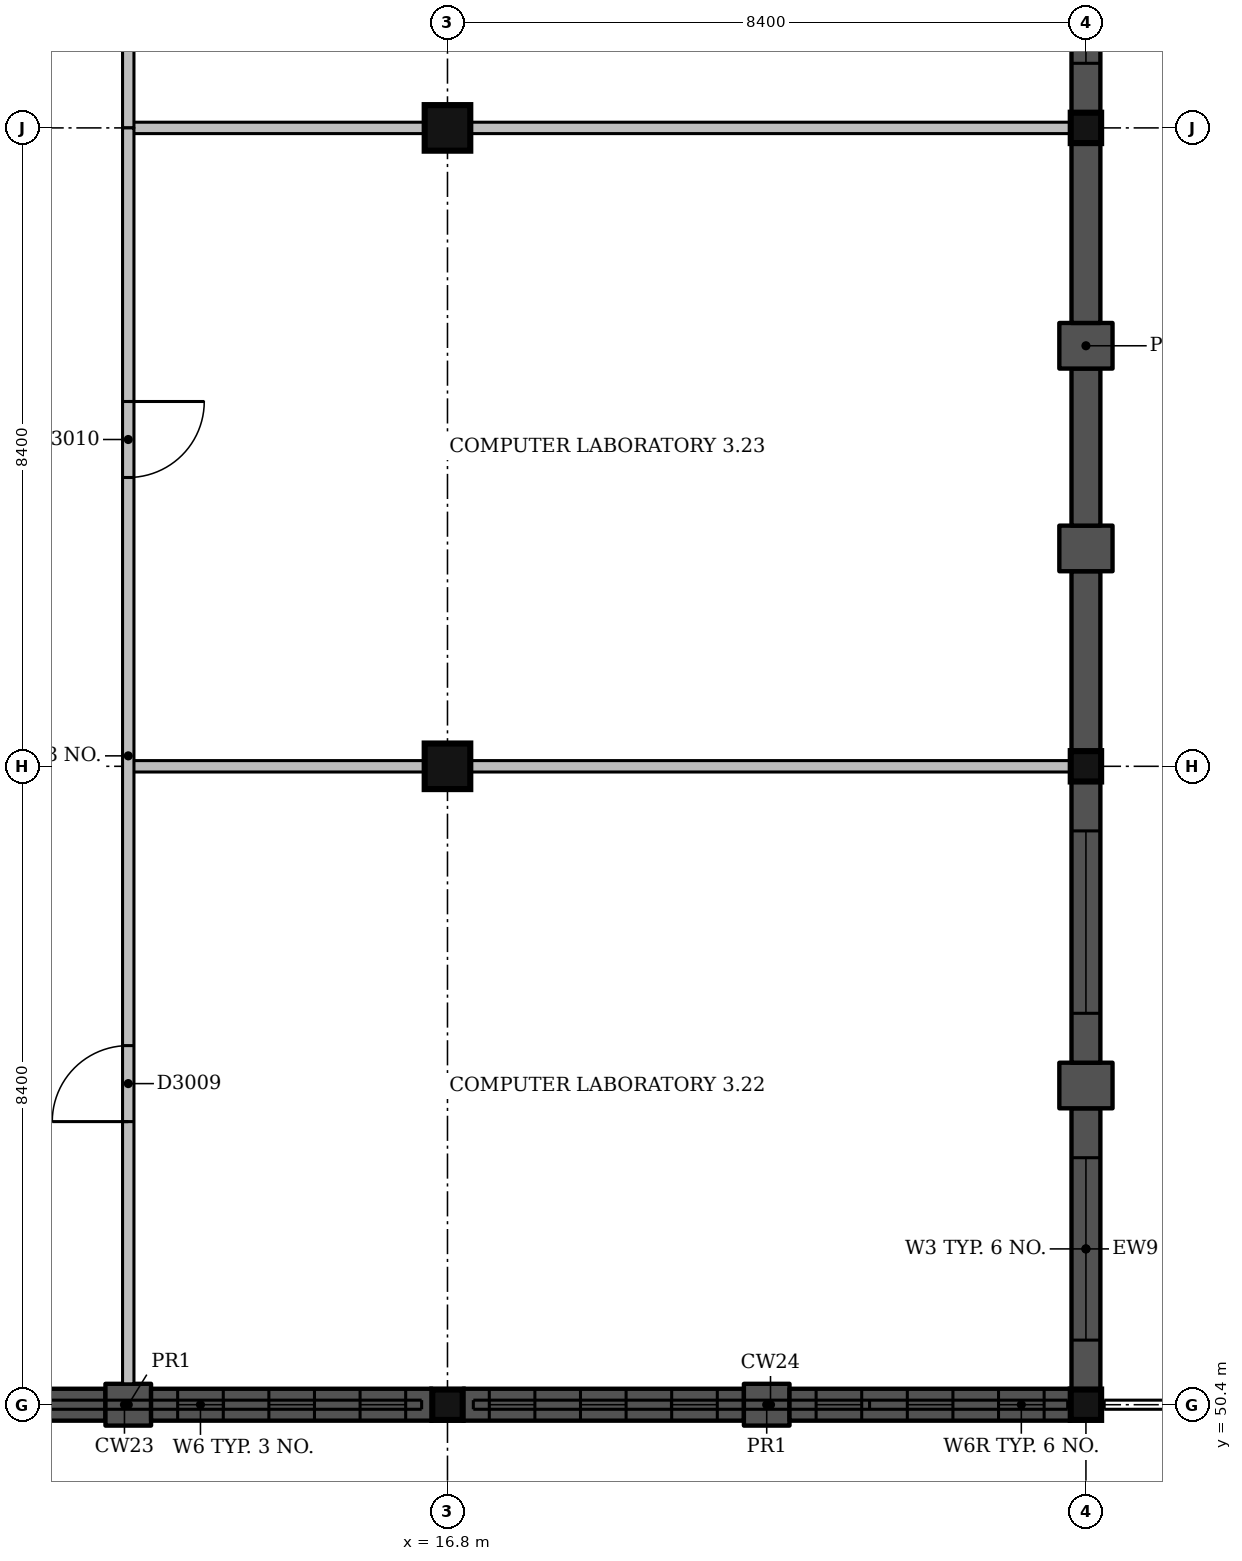
"""IFC4 building model, lengths in metres.
Left out: names, types, materials, properties, quantities, classifications, styles, units other than length and angle.
Written with IfcOpenShell. Run it as: python <this file> out.ifc"""

import sys

from ifc_helpers import new_model, si_unit, direction, frame, frame_2d, origin, origin_2d, place, context, subcontext, project, spatial, rectangle, extrude, element, fill, save


model = new_model("IFC4")
c1 = context("Model", 3, precision=1e-05, world=origin(), true_north=direction((0.0, 1.0)))
c2 = subcontext(c1, "Body", "Model", "MODEL_VIEW")
j1 = project(units=[si_unit("LENGTHUNIT", "METRE"), si_unit("PLANEANGLEUNIT", "RADIAN")], contexts=[c1])
p1 = place(None, origin())
s1 = spatial("IfcSite", under=j1, at=p1, CompositionType="ELEMENT")
p2 = place(p1, origin())
s2 = spatial("IfcBuilding", under=s1, at=p2, CompositionType="ELEMENT")
p3 = place(p2, frame((0.0, 0.0, 13.5)))
s3 = spatial("IfcBuildingStorey", under=s2, at=p3, CompositionType="ELEMENT", Elevation=13.5)
p4 = place(p3, frame((16.8, 50.4, 0.0), z_axis=(0.0, 0.0, 1.0), x_axis=(1.0, 0.0, 0.0)))
e1 = element("IfcColumn", 1, at=p4, inside=s3, PredefinedType="COLUMN", context=c2, shape_type="SweptSolid", body=[
    extrude(rectangle(XDim=0.4, YDim=0.4, at=origin_2d()), origin(), (0.0, 0.0, 1.0), 4.5),
])
for number, where, z_axis, x_axis in (
    (2, (16.8, 58.8, 0.0), (0.0, 0.0, 1.0), (1.0, 0.0, 0.0)),
    (3, (16.8, 67.2, 0.0), (0.0, 0.0, 1.0), (1.0, 0.0, 0.0)),
):
    element("IfcColumn", number, at=place(p3, frame(where, z_axis=z_axis, x_axis=x_axis)), inside=s3, PredefinedType="COLUMN", context=c2, shape_type="SweptSolid", body=[
        extrude(rectangle(XDim=0.6, YDim=0.6, at=origin_2d()), origin(), (0.0, 0.0, 1.0), 4.5),
    ])
for number, where, z_axis, x_axis in (
    (4, (25.2, 50.4, 0.0), (0.0, 0.0, 1.0), (1.0, 0.0, 0.0)),
    (5, (25.2, 58.8, 0.0), (0.0, 0.0, 1.0), (1.0, 0.0, 0.0)),
    (6, (25.2, 67.2, 0.0), (0.0, 0.0, 1.0), (1.0, 0.0, 0.0)),
):
    element("IfcColumn", number, at=place(p3, frame(where, z_axis=z_axis, x_axis=x_axis)), inside=s3, PredefinedType="COLUMN", context=c2, shape_type="SweptSolid", body=[
        extrude(rectangle(XDim=0.4, YDim=0.4, at=origin_2d()), origin(), (0.0, 0.0, 1.0), 4.5),
    ])
p5 = place(p3, frame((25.2, 50.6, 0.0), z_axis=(0.0, 0.0, 1.0), x_axis=(0.0, 1.0, 0.0)))
e7 = element("IfcWall", 7, at=p5, inside=s3, PredefinedType="SOLIDWALL", context=c2, shape_type="SweptSolid", body=[
    extrude(rectangle(XDim=3.7, YDim=0.38, at=frame_2d((1.85, 0.0))), origin(), (0.0, 0.0, 1.0), 4.2),
])
p6 = place(p5, frame((0.65, 0.0, 1.2)))
e8 = element("IfcOpeningElement", 8, at=p6, cuts=e7, PredefinedType="OPENING", context=c2, shape_type="SweptSolid", body=[
    extrude(rectangle(XDim=2.4, YDim=1.5, at=frame_2d((1.2, 0.75))), frame((0.0, 0.2, 0.0), z_axis=(0.0, -1.0, 0.0), x_axis=(1.0, 0.0, 0.0)), (0.0, 0.0, 1.0), 0.4),
])
p7 = place(p3, frame((25.2, 54.3, 0.0), z_axis=(0.0, 0.0, 1.0), x_axis=(0.0, 1.0, 0.0)))
e9 = element("IfcWall", 9, at=p7, inside=s3, PredefinedType="SOLIDWALL", context=c2, shape_type="SweptSolid", body=[
    extrude(rectangle(XDim=0.6, YDim=0.7, at=frame_2d((0.3, 0.0))), origin(), (0.0, 0.0, 1.0), 4.2),
])
p8 = place(p3, frame((25.2, 54.9, 0.0), z_axis=(0.0, 0.0, 1.0), x_axis=(0.0, 1.0, 0.0)))
e10 = element("IfcWall", 10, at=p8, inside=s3, PredefinedType="SOLIDWALL", context=c2, shape_type="SweptSolid", body=[
    extrude(rectangle(XDim=3.7, YDim=0.38, at=frame_2d((1.85, 0.0))), origin(), (0.0, 0.0, 1.0), 4.2),
])
p9 = place(p8, frame((0.65, 0.0, 1.2)))
e11 = element("IfcOpeningElement", 11, at=p9, cuts=e10, PredefinedType="OPENING", context=c2, shape_type="SweptSolid", body=[
    extrude(rectangle(XDim=2.4, YDim=1.5, at=frame_2d((1.2, 0.75))), frame((0.0, 0.2, 0.0), z_axis=(0.0, -1.0, 0.0), x_axis=(1.0, 0.0, 0.0)), (0.0, 0.0, 1.0), 0.4),
])
p10 = place(p3, frame((25.2, 59.0, 0.0), z_axis=(0.0, 0.0, 1.0), x_axis=(0.0, 1.0, 0.0)))
e12 = element("IfcWall", 12, at=p10, inside=s3, PredefinedType="SOLIDWALL", context=c2, shape_type="SweptSolid", body=[
    extrude(rectangle(XDim=2.367, YDim=0.38, at=frame_2d((1.183, 0.0))), origin(), (0.0, 0.0, 1.0), 3.35),
])
p11 = place(p3, frame((25.2, 61.367, 0.0), z_axis=(0.0, 0.0, 1.0), x_axis=(0.0, 1.0, 0.0)))
e13 = element("IfcWall", 13, at=p11, inside=s3, PredefinedType="SOLIDWALL", context=c2, shape_type="SweptSolid", body=[
    extrude(rectangle(XDim=0.6, YDim=0.7, at=frame_2d((0.3, 0.0))), origin(), (0.0, 0.0, 1.0), 3.35),
])
p12 = place(p3, frame((25.2, 61.967, 0.0), z_axis=(0.0, 0.0, 1.0), x_axis=(0.0, 1.0, 0.0)))
e14 = element("IfcWall", 14, at=p12, inside=s3, PredefinedType="SOLIDWALL", context=c2, shape_type="SweptSolid", body=[
    extrude(rectangle(XDim=2.066, YDim=0.38, at=frame_2d((1.033, 0.0))), origin(), (0.0, 0.0, 1.0), 3.35),
])
p13 = place(p3, frame((25.2, 64.033, 0.0), z_axis=(0.0, 0.0, 1.0), x_axis=(0.0, 1.0, 0.0)))
e15 = element("IfcWall", 15, at=p13, inside=s3, PredefinedType="SOLIDWALL", context=c2, shape_type="SweptSolid", body=[
    extrude(rectangle(XDim=0.6, YDim=0.7, at=frame_2d((0.3, 0.0))), origin(), (0.0, 0.0, 1.0), 3.35),
])
p14 = place(p3, frame((25.2, 64.633, 0.0), z_axis=(0.0, 0.0, 1.0), x_axis=(0.0, 1.0, 0.0)))
e16 = element("IfcWall", 16, at=p14, inside=s3, PredefinedType="SOLIDWALL", context=c2, shape_type="SweptSolid", body=[
    extrude(rectangle(XDim=2.367, YDim=0.38, at=frame_2d((1.183, 0.0))), origin(), (0.0, 0.0, 1.0), 3.35),
])
p15 = place(p3, frame((25.2, 67.4, 0.0), z_axis=(0.0, 0.0, 1.0), x_axis=(0.0, 1.0, 0.0)))
e17 = element("IfcWall", 17, at=p15, inside=s3, PredefinedType="SOLIDWALL", context=c2, shape_type="SweptSolid", body=[
    extrude(rectangle(XDim=3.7, YDim=0.38, at=frame_2d((1.85, 0.0))), origin(), (0.0, 0.0, 1.0), 3.35),
])
p16 = place(p15, frame((0.65, 0.0, 1.2)))
e18 = element("IfcOpeningElement", 18, at=p16, cuts=e17, PredefinedType="OPENING", context=c2, shape_type="SweptSolid", body=[
    extrude(rectangle(XDim=2.4, YDim=1.5, at=frame_2d((1.2, 0.75))), frame((0.0, 0.2, 0.0), z_axis=(0.0, -1.0, 0.0), x_axis=(1.0, 0.0, 0.0)), (0.0, 0.0, 1.0), 0.4),
])
p17 = place(p3, frame((8.6, 50.4, 0.0), z_axis=(0.0, 0.0, 1.0), x_axis=(1.0, 0.0, 0.0)))
e19 = element("IfcWall", 19, at=p17, inside=s3, PredefinedType="SOLIDWALL", context=c2, shape_type="SweptSolid", body=[
    extrude(rectangle(XDim=3.7, YDim=0.42, at=frame_2d((1.85, 0.0))), origin(), (0.0, 0.0, 1.0), 4.2),
])
p18 = place(p3, frame((12.3, 50.4, 0.0), z_axis=(0.0, 0.0, 1.0), x_axis=(1.0, 0.0, 0.0)))
e20 = element("IfcWall", 20, at=p18, inside=s3, PredefinedType="SOLIDWALL", context=c2, shape_type="SweptSolid", body=[
    extrude(rectangle(XDim=0.6, YDim=0.55, at=frame_2d((0.3, 0.0))), origin(), (0.0, 0.0, 1.0), 4.2),
])
p19 = place(p3, frame((12.9, 50.4, 0.0), z_axis=(0.0, 0.0, 1.0), x_axis=(1.0, 0.0, 0.0)))
e21 = element("IfcWall", 21, at=p19, inside=s3, PredefinedType="SOLIDWALL", context=c2, shape_type="SweptSolid", body=[
    extrude(rectangle(XDim=3.7, YDim=0.42, at=frame_2d((1.85, 0.0))), origin(), (0.0, 0.0, 1.0), 4.2),
])
p20 = place(p19, frame((0.35, 0.0, 1.0)))
e22 = element("IfcOpeningElement", 22, at=p20, cuts=e21, PredefinedType="OPENING", context=c2, shape_type="SweptSolid", body=[
    extrude(rectangle(XDim=0.6, YDim=2.1, at=frame_2d((0.3, 1.05))), frame((0.0, 0.22, 0.0), z_axis=(0.0, -1.0, 0.0), x_axis=(1.0, 0.0, 0.0)), (0.0, 0.0, 1.0), 0.44),
])
p21 = place(p19, frame((1.55, 0.0, 1.0)))
e23 = element("IfcOpeningElement", 23, at=p21, cuts=e21, PredefinedType="OPENING", context=c2, shape_type="SweptSolid", body=[
    extrude(rectangle(XDim=0.6, YDim=2.1, at=frame_2d((0.3, 1.05))), frame((0.0, 0.22, 0.0), z_axis=(0.0, -1.0, 0.0), x_axis=(1.0, 0.0, 0.0)), (0.0, 0.0, 1.0), 0.44),
])
p22 = place(p19, frame((2.75, 0.0, 1.0)))
e24 = element("IfcOpeningElement", 24, at=p22, cuts=e21, PredefinedType="OPENING", context=c2, shape_type="SweptSolid", body=[
    extrude(rectangle(XDim=0.6, YDim=2.1, at=frame_2d((0.3, 1.05))), frame((0.0, 0.22, 0.0), z_axis=(0.0, -1.0, 0.0), x_axis=(1.0, 0.0, 0.0)), (0.0, 0.0, 1.0), 0.44),
])
p23 = place(p3, frame((17.0, 50.4, 0.0), z_axis=(0.0, 0.0, 1.0), x_axis=(1.0, 0.0, 0.0)))
e25 = element("IfcWall", 25, at=p23, inside=s3, PredefinedType="SOLIDWALL", context=c2, shape_type="SweptSolid", body=[
    extrude(rectangle(XDim=3.7, YDim=0.42, at=frame_2d((1.85, 0.0))), origin(), (0.0, 0.0, 1.0), 3.35),
])
p24 = place(p23, frame((0.35, 0.0, 1.0)))
e26 = element("IfcOpeningElement", 26, at=p24, cuts=e25, PredefinedType="OPENING", context=c2, shape_type="SweptSolid", body=[
    extrude(rectangle(XDim=0.6, YDim=1.8, at=frame_2d((0.3, 0.9))), frame((0.0, 0.22, 0.0), z_axis=(0.0, -1.0, 0.0), x_axis=(1.0, 0.0, 0.0)), (0.0, 0.0, 1.0), 0.44),
])
p25 = place(p23, frame((1.55, 0.0, 1.0)))
e27 = element("IfcOpeningElement", 27, at=p25, cuts=e25, PredefinedType="OPENING", context=c2, shape_type="SweptSolid", body=[
    extrude(rectangle(XDim=0.6, YDim=1.8, at=frame_2d((0.3, 0.9))), frame((0.0, 0.22, 0.0), z_axis=(0.0, -1.0, 0.0), x_axis=(1.0, 0.0, 0.0)), (0.0, 0.0, 1.0), 0.44),
])
p26 = place(p23, frame((2.75, 0.0, 1.0)))
e28 = element("IfcOpeningElement", 28, at=p26, cuts=e25, PredefinedType="OPENING", context=c2, shape_type="SweptSolid", body=[
    extrude(rectangle(XDim=0.6, YDim=1.8, at=frame_2d((0.3, 0.9))), frame((0.0, 0.22, 0.0), z_axis=(0.0, -1.0, 0.0), x_axis=(1.0, 0.0, 0.0)), (0.0, 0.0, 1.0), 0.44),
])
p27 = place(p3, frame((20.7, 50.4, 0.0), z_axis=(0.0, 0.0, 1.0), x_axis=(1.0, 0.0, 0.0)))
e29 = element("IfcWall", 29, at=p27, inside=s3, PredefinedType="SOLIDWALL", context=c2, shape_type="SweptSolid", body=[
    extrude(rectangle(XDim=0.6, YDim=0.55, at=frame_2d((0.3, 0.0))), origin(), (0.0, 0.0, 1.0), 3.35),
])
p28 = place(p3, frame((21.3, 50.4, 0.0), z_axis=(0.0, 0.0, 1.0), x_axis=(1.0, 0.0, 0.0)))
e30 = element("IfcWall", 30, at=p28, inside=s3, PredefinedType="SOLIDWALL", context=c2, shape_type="SweptSolid", body=[
    extrude(rectangle(XDim=3.7, YDim=0.42, at=frame_2d((1.85, 0.0))), origin(), (0.0, 0.0, 1.0), 3.35),
])
p29 = place(p28, frame((0.35, 0.0, 1.0)))
e31 = element("IfcOpeningElement", 31, at=p29, cuts=e30, PredefinedType="OPENING", context=c2, shape_type="SweptSolid", body=[
    extrude(rectangle(XDim=0.6, YDim=1.8, at=frame_2d((0.3, 0.9))), frame((0.0, 0.22, 0.0), z_axis=(0.0, -1.0, 0.0), x_axis=(1.0, 0.0, 0.0)), (0.0, 0.0, 1.0), 0.44),
])
p30 = place(p28, frame((1.55, 0.0, 1.0)))
e32 = element("IfcOpeningElement", 32, at=p30, cuts=e30, PredefinedType="OPENING", context=c2, shape_type="SweptSolid", body=[
    extrude(rectangle(XDim=0.6, YDim=1.8, at=frame_2d((0.3, 0.9))), frame((0.0, 0.22, 0.0), z_axis=(0.0, -1.0, 0.0), x_axis=(1.0, 0.0, 0.0)), (0.0, 0.0, 1.0), 0.44),
])
p31 = place(p28, frame((2.75, 0.0, 1.0)))
e33 = element("IfcOpeningElement", 33, at=p31, cuts=e30, PredefinedType="OPENING", context=c2, shape_type="SweptSolid", body=[
    extrude(rectangle(XDim=0.6, YDim=1.8, at=frame_2d((0.3, 0.9))), frame((0.0, 0.22, 0.0), z_axis=(0.0, -1.0, 0.0), x_axis=(1.0, 0.0, 0.0)), (0.0, 0.0, 1.0), 0.44),
])
p32 = place(p3, frame((12.6, 58.8, 0.0), z_axis=(0.0, 0.0, 1.0), x_axis=(1.0, 0.0, 0.0)))
e34 = element("IfcWall", 34, at=p32, inside=s3, PredefinedType="PARTITIONING", context=c2, shape_type="SweptSolid", body=[
    extrude(rectangle(XDim=3.9, YDim=0.15, at=frame_2d((1.95, 0.0))), origin(), (0.0, 0.0, 1.0), 3.4),
])
p33 = place(p3, frame((17.1, 58.8, 0.0), z_axis=(0.0, 0.0, 1.0), x_axis=(1.0, 0.0, 0.0)))
e35 = element("IfcWall", 35, at=p33, inside=s3, PredefinedType="PARTITIONING", context=c2, shape_type="SweptSolid", body=[
    extrude(rectangle(XDim=7.9, YDim=0.15, at=frame_2d((3.95, 0.0))), origin(), (0.0, 0.0, 1.0), 3.35),
])
p34 = place(p3, frame((12.6, 67.2, 0.0), z_axis=(0.0, 0.0, 1.0), x_axis=(1.0, 0.0, 0.0)))
e36 = element("IfcWall", 36, at=p34, inside=s3, PredefinedType="PARTITIONING", context=c2, shape_type="SweptSolid", body=[
    extrude(rectangle(XDim=3.9, YDim=0.15, at=frame_2d((1.95, 0.0))), origin(), (0.0, 0.0, 1.0), 3.4),
])
p35 = place(p3, frame((17.1, 67.2, 0.0), z_axis=(0.0, 0.0, 1.0), x_axis=(1.0, 0.0, 0.0)))
e37 = element("IfcWall", 37, at=p35, inside=s3, PredefinedType="PARTITIONING", context=c2, shape_type="SweptSolid", body=[
    extrude(rectangle(XDim=7.9, YDim=0.15, at=frame_2d((3.95, 0.0))), origin(), (0.0, 0.0, 1.0), 3.35),
])
p36 = place(p3, frame((12.6, 67.2, 0.0), z_axis=(0.0, 0.0, 1.0), x_axis=(0.0, 1.0, 0.0)))
e38 = element("IfcWall", 38, at=p36, inside=s3, PredefinedType="PARTITIONING", context=c2, shape_type="SweptSolid", body=[
    extrude(rectangle(XDim=8.4, YDim=0.15, at=frame_2d((4.2, 0.0))), origin(), (0.0, 0.0, 1.0), 3.4),
])
p37 = place(p3, frame((12.6, 50.675, 0.0), z_axis=(0.0, 0.0, 1.0), x_axis=(0.0, 1.0, 0.0)))
e39 = element("IfcWall", 39, at=p37, inside=s3, PredefinedType="PARTITIONING", context=c2, shape_type="SweptSolid", body=[
    extrude(rectangle(XDim=16.525, YDim=0.15, at=frame_2d((8.262, 0.0))), origin(), (0.0, 0.0, 1.0), 3.4),
])
p38 = place(p37, frame((3.45, 0.0, 0.0)))
e40 = element("IfcOpeningElement", 40, at=p38, cuts=e39, PredefinedType="OPENING", context=c2, shape_type="SweptSolid", body=[
    extrude(rectangle(XDim=1.0, YDim=2.1, at=frame_2d((0.5, 1.05))), frame((0.0, 0.085, 0.0), z_axis=(0.0, -1.0, 0.0), x_axis=(1.0, 0.0, 0.0)), (0.0, 0.0, 1.0), 0.17),
])
p39 = place(p37, frame((11.925, 0.0, 0.0)))
e41 = element("IfcOpeningElement", 41, at=p39, cuts=e39, PredefinedType="OPENING", context=c2, shape_type="SweptSolid", body=[
    extrude(rectangle(XDim=1.0, YDim=2.1, at=frame_2d((0.5, 1.05))), frame((0.0, 0.085, 0.0), z_axis=(0.0, -1.0, 0.0), x_axis=(1.0, 0.0, 0.0)), (0.0, 0.0, 1.0), 0.17),
])
p40 = place(p6, origin())
e42 = element("IfcWindow", 42, at=p40, inside=s3, PartitioningType="SINGLE_PANEL", PredefinedType="WINDOW", context=c2, shape_type="SweptSolid", body=[
    extrude(rectangle(XDim=2.4, YDim=1.5, at=frame_2d((1.2, 0.75))), frame((0.0, 0.15, 0.0), z_axis=(0.0, -1.0, 0.0), x_axis=(1.0, 0.0, 0.0)), (0.0, 0.0, 1.0), 0.06),
])
fill(e8, e42)
p41 = place(p9, origin())
e43 = element("IfcWindow", 43, at=p41, inside=s3, PartitioningType="SINGLE_PANEL", PredefinedType="WINDOW", context=c2, shape_type="SweptSolid", body=[
    extrude(rectangle(XDim=2.4, YDim=1.5, at=frame_2d((1.2, 0.75))), frame((0.0, 0.15, 0.0), z_axis=(0.0, -1.0, 0.0), x_axis=(1.0, 0.0, 0.0)), (0.0, 0.0, 1.0), 0.06),
])
fill(e11, e43)
p42 = place(p16, origin())
e44 = element("IfcWindow", 44, at=p42, inside=s3, PartitioningType="SINGLE_PANEL", PredefinedType="WINDOW", context=c2, shape_type="SweptSolid", body=[
    extrude(rectangle(XDim=2.4, YDim=1.5, at=frame_2d((1.2, 0.75))), frame((0.0, 0.15, 0.0), z_axis=(0.0, -1.0, 0.0), x_axis=(1.0, 0.0, 0.0)), (0.0, 0.0, 1.0), 0.06),
])
fill(e18, e44)
p43 = place(p20, origin())
e45 = element("IfcWindow", 45, at=p43, inside=s3, PartitioningType="SINGLE_PANEL", PredefinedType="WINDOW", context=c2, shape_type="SweptSolid", body=[
    extrude(rectangle(XDim=0.6, YDim=2.1, at=frame_2d((0.3, 1.05))), frame((0.0, 0.15, 0.0), z_axis=(0.0, -1.0, 0.0), x_axis=(1.0, 0.0, 0.0)), (0.0, 0.0, 1.0), 0.06),
])
fill(e22, e45)
p44 = place(p21, origin())
e46 = element("IfcWindow", 46, at=p44, inside=s3, PartitioningType="SINGLE_PANEL", PredefinedType="WINDOW", context=c2, shape_type="SweptSolid", body=[
    extrude(rectangle(XDim=0.6, YDim=2.1, at=frame_2d((0.3, 1.05))), frame((0.0, 0.15, 0.0), z_axis=(0.0, -1.0, 0.0), x_axis=(1.0, 0.0, 0.0)), (0.0, 0.0, 1.0), 0.06),
])
fill(e23, e46)
p45 = place(p22, origin())
e47 = element("IfcWindow", 47, at=p45, inside=s3, PartitioningType="SINGLE_PANEL", PredefinedType="WINDOW", context=c2, shape_type="SweptSolid", body=[
    extrude(rectangle(XDim=0.6, YDim=2.1, at=frame_2d((0.3, 1.05))), frame((0.0, 0.15, 0.0), z_axis=(0.0, -1.0, 0.0), x_axis=(1.0, 0.0, 0.0)), (0.0, 0.0, 1.0), 0.06),
])
fill(e24, e47)
p46 = place(p24, origin())
e48 = element("IfcWindow", 48, at=p46, inside=s3, PartitioningType="SINGLE_PANEL", PredefinedType="WINDOW", context=c2, shape_type="SweptSolid", body=[
    extrude(rectangle(XDim=0.6, YDim=1.8, at=frame_2d((0.3, 0.9))), frame((0.0, 0.15, 0.0), z_axis=(0.0, -1.0, 0.0), x_axis=(1.0, 0.0, 0.0)), (0.0, 0.0, 1.0), 0.06),
])
fill(e26, e48)
p47 = place(p25, origin())
e49 = element("IfcWindow", 49, at=p47, inside=s3, PartitioningType="SINGLE_PANEL", PredefinedType="WINDOW", context=c2, shape_type="SweptSolid", body=[
    extrude(rectangle(XDim=0.6, YDim=1.8, at=frame_2d((0.3, 0.9))), frame((0.0, 0.15, 0.0), z_axis=(0.0, -1.0, 0.0), x_axis=(1.0, 0.0, 0.0)), (0.0, 0.0, 1.0), 0.06),
])
fill(e27, e49)
p48 = place(p26, origin())
e50 = element("IfcWindow", 50, at=p48, inside=s3, PartitioningType="SINGLE_PANEL", PredefinedType="WINDOW", context=c2, shape_type="SweptSolid", body=[
    extrude(rectangle(XDim=0.6, YDim=1.8, at=frame_2d((0.3, 0.9))), frame((0.0, 0.15, 0.0), z_axis=(0.0, -1.0, 0.0), x_axis=(1.0, 0.0, 0.0)), (0.0, 0.0, 1.0), 0.06),
])
fill(e28, e50)
p49 = place(p29, origin())
e51 = element("IfcWindow", 51, at=p49, inside=s3, PartitioningType="SINGLE_PANEL", PredefinedType="WINDOW", context=c2, shape_type="SweptSolid", body=[
    extrude(rectangle(XDim=0.6, YDim=1.8, at=frame_2d((0.3, 0.9))), frame((0.0, 0.15, 0.0), z_axis=(0.0, -1.0, 0.0), x_axis=(1.0, 0.0, 0.0)), (0.0, 0.0, 1.0), 0.06),
])
fill(e31, e51)
p50 = place(p30, origin())
e52 = element("IfcWindow", 52, at=p50, inside=s3, PartitioningType="SINGLE_PANEL", PredefinedType="WINDOW", context=c2, shape_type="SweptSolid", body=[
    extrude(rectangle(XDim=0.6, YDim=1.8, at=frame_2d((0.3, 0.9))), frame((0.0, 0.15, 0.0), z_axis=(0.0, -1.0, 0.0), x_axis=(1.0, 0.0, 0.0)), (0.0, 0.0, 1.0), 0.06),
])
fill(e32, e52)
p51 = place(p31, origin())
e53 = element("IfcWindow", 53, at=p51, inside=s3, PartitioningType="SINGLE_PANEL", PredefinedType="WINDOW", context=c2, shape_type="SweptSolid", body=[
    extrude(rectangle(XDim=0.6, YDim=1.8, at=frame_2d((0.3, 0.9))), frame((0.0, 0.15, 0.0), z_axis=(0.0, -1.0, 0.0), x_axis=(1.0, 0.0, 0.0)), (0.0, 0.0, 1.0), 0.06),
])
fill(e33, e53)
p52 = place(p38, origin())
e54 = element("IfcDoor", 54, at=p52, inside=s3, OperationType="SINGLE_SWING_LEFT", PredefinedType="DOOR", context=c2, shape_type="SweptSolid", body=[
    extrude(rectangle(XDim=1.0, YDim=2.1, at=frame_2d((0.5, 1.05))), frame((0.0, 0.025, 0.0), z_axis=(0.0, -1.0, 0.0), x_axis=(1.0, 0.0, 0.0)), (0.0, 0.0, 1.0), 0.05),
])
fill(e40, e54)
p53 = place(p39, origin())
e55 = element("IfcDoor", 55, at=p53, inside=s3, OperationType="SINGLE_SWING_RIGHT", PredefinedType="DOOR", context=c2, shape_type="SweptSolid", body=[
    extrude(rectangle(XDim=1.0, YDim=2.1, at=frame_2d((0.5, 1.05))), frame((0.0, 0.025, 0.0), z_axis=(0.0, -1.0, 0.0), x_axis=(1.0, 0.0, 0.0)), (0.0, 0.0, 1.0), 0.05),
])
fill(e41, e55)
save(model, sys.argv[1])
